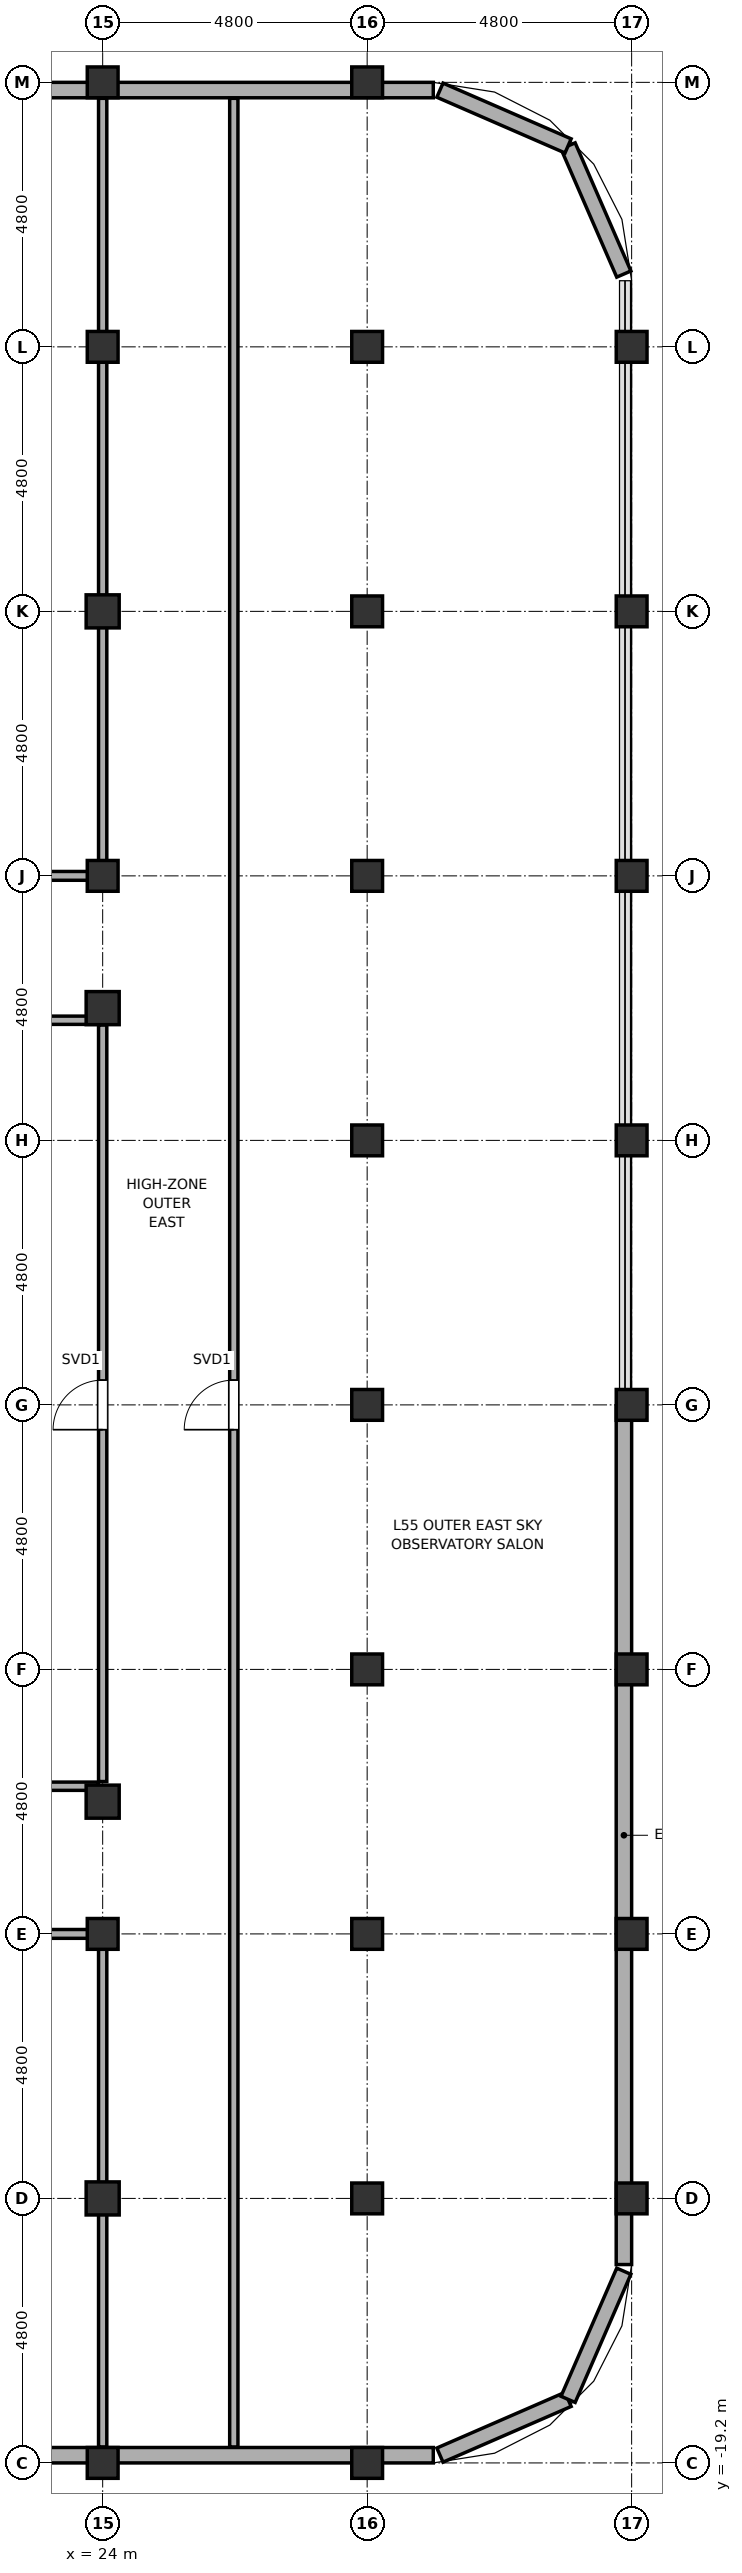
"""IFC4 building model, lengths in metres.
Left out: names, types, materials, properties, quantities, classifications, styles, units other than length and angle.
Written with IfcOpenShell. Run it as: python <this file> out.ifc"""

import sys

from ifc_helpers import new_model, si_unit, direction, frame, frame_2d, origin, origin_2d, place, context, subcontext, project, spatial, rectangle, hollow_rectangle, hollow_circle, extrude, element, fill, save


model = new_model("IFC4")
c1 = context("Model", 3, precision=1e-05, world=origin(), true_north=direction((0.0, 1.0)))
c2 = subcontext(c1, "Body", "Model", "MODEL_VIEW")
j1 = project(units=[si_unit("LENGTHUNIT", "METRE"), si_unit("PLANEANGLEUNIT", "RADIAN")], contexts=[c1])
p1 = place(None, origin())
s1 = spatial("IfcSite", under=j1, at=p1, CompositionType="ELEMENT")
p2 = place(p1, origin())
s2 = spatial("IfcBuilding", under=s1, at=p2, CompositionType="ELEMENT")
p3 = place(p2, frame((0.0, 0.0, 222.3)))
s3 = spatial("IfcBuildingStorey", under=s2, at=p3, CompositionType="ELEMENT", Elevation=222.3)
p4 = place(p3, frame((24.0, -19.2, 0.0), z_axis=(0.0, 0.0, 1.0), x_axis=(1.0, 0.0, 0.0)))
e1 = element("IfcColumn", 1, at=p4, inside=s3, PredefinedType="COLUMN", context=c2, shape_type="SweptSolid", body=[
    extrude(hollow_circle(Radius=0.28, WallThickness=0.025, at=origin_2d()), origin(), (0.0, 0.0, 1.0), 3.85),
])
p5 = place(p3, frame((24.0, -14.4, 0.0), z_axis=(0.0, 0.0, 1.0), x_axis=(1.0, 0.0, 0.0)))
e2 = element("IfcColumn", 2, at=p5, inside=s3, PredefinedType="COLUMN", context=c2, shape_type="SweptSolid", body=[
    extrude(hollow_rectangle(XDim=0.6, YDim=0.6, WallThickness=0.028, at=origin_2d()), origin(), (0.0, 0.0, 1.0), 3.85),
])
p6 = place(p3, frame((24.0, -9.6, 0.0), z_axis=(0.0, 0.0, 1.0), x_axis=(1.0, 0.0, 0.0)))
e3 = element("IfcColumn", 3, at=p6, inside=s3, PredefinedType="COLUMN", context=c2, shape_type="SweptSolid", body=[
    extrude(hollow_circle(Radius=0.28, WallThickness=0.025, at=origin_2d()), origin(), (0.0, 0.0, 1.0), 3.85),
])
for number, where, z_axis, x_axis in (
    (4, (24.0, -7.2, 0.0), (0.0, 0.0, 1.0), (1.0, 0.0, 0.0)),
    (5, (24.0, 7.2, 0.0), (0.0, 0.0, 1.0), (1.0, 0.0, 0.0)),
):
    element("IfcColumn", number, at=place(p3, frame(where, z_axis=z_axis, x_axis=x_axis)), inside=s3, PredefinedType="COLUMN", context=c2, shape_type="SweptSolid", body=[
        extrude(hollow_rectangle(XDim=0.6, YDim=0.6, WallThickness=0.028, at=origin_2d()), origin(), (0.0, 0.0, 1.0), 3.85),
    ])
p7 = place(p3, frame((24.0, 9.6, 0.0), z_axis=(0.0, 0.0, 1.0), x_axis=(1.0, 0.0, 0.0)))
e6 = element("IfcColumn", 6, at=p7, inside=s3, PredefinedType="COLUMN", context=c2, shape_type="SweptSolid", body=[
    extrude(hollow_circle(Radius=0.28, WallThickness=0.025, at=origin_2d()), origin(), (0.0, 0.0, 1.0), 3.85),
])
p8 = place(p3, frame((24.0, 14.4, 0.0), z_axis=(0.0, 0.0, 1.0), x_axis=(1.0, 0.0, 0.0)))
e7 = element("IfcColumn", 7, at=p8, inside=s3, PredefinedType="COLUMN", context=c2, shape_type="SweptSolid", body=[
    extrude(hollow_rectangle(XDim=0.6, YDim=0.6, WallThickness=0.028, at=origin_2d()), origin(), (0.0, 0.0, 1.0), 3.85),
])
p9 = place(p3, frame((24.0, 19.2, 0.0), z_axis=(0.0, 0.0, 1.0), x_axis=(1.0, 0.0, 0.0)))
e8 = element("IfcColumn", 8, at=p9, inside=s3, PredefinedType="COLUMN", context=c2, shape_type="SweptSolid", body=[
    extrude(hollow_circle(Radius=0.28, WallThickness=0.025, at=origin_2d()), origin(), (0.0, 0.0, 1.0), 3.85),
])
p10 = place(p3, frame((24.0, 24.0, -0.18), z_axis=(0.0, 0.0, 1.0), x_axis=(1.0, 0.0, 0.0)))
e9 = element("IfcColumn", 9, at=p10, inside=s3, PredefinedType="COLUMN", context=c2, shape_type="SweptSolid", body=[
    extrude(hollow_circle(Radius=0.28, WallThickness=0.025, at=origin_2d()), origin(), (0.0, 0.0, 1.0), 4.03),
])
for number, where, z_axis, x_axis in (
    (10, (28.8, -19.2, 0.0), (0.0, 0.0, 1.0), (1.0, 0.0, 0.0)),
    (11, (28.8, -14.4, 0.0), (0.0, 0.0, 1.0), (1.0, 0.0, 0.0)),
    (12, (28.8, -9.6, 0.0), (0.0, 0.0, 1.0), (1.0, 0.0, 0.0)),
    (13, (28.8, -4.8, 0.0), (0.0, 0.0, 1.0), (1.0, 0.0, 0.0)),
    (14, (28.8, 0.0, 0.0), (0.0, 0.0, 1.0), (1.0, 0.0, 0.0)),
    (15, (28.8, 4.8, 0.0), (0.0, 0.0, 1.0), (1.0, 0.0, 0.0)),
    (16, (28.8, 9.6, 0.0), (0.0, 0.0, 1.0), (1.0, 0.0, 0.0)),
    (17, (28.8, 14.4, 0.0), (0.0, 0.0, 1.0), (1.0, 0.0, 0.0)),
    (18, (28.8, 19.2, 0.0), (0.0, 0.0, 1.0), (1.0, 0.0, 0.0)),
):
    element("IfcColumn", number, at=place(p3, frame(where, z_axis=z_axis, x_axis=x_axis)), inside=s3, PredefinedType="COLUMN", context=c2, shape_type="SweptSolid", body=[
        extrude(hollow_circle(Radius=0.28, WallThickness=0.025, at=origin_2d()), origin(), (0.0, 0.0, 1.0), 3.85),
    ])
p11 = place(p3, frame((28.8, 24.0, -0.18), z_axis=(0.0, 0.0, 1.0), x_axis=(1.0, 0.0, 0.0)))
e19 = element("IfcColumn", 19, at=p11, inside=s3, PredefinedType="COLUMN", context=c2, shape_type="SweptSolid", body=[
    extrude(hollow_circle(Radius=0.28, WallThickness=0.025, at=origin_2d()), origin(), (0.0, 0.0, 1.0), 4.03),
])
for number, where, z_axis, x_axis in (
    (20, (33.6, -14.4, 0.0), (0.0, 0.0, 1.0), (1.0, 0.0, 0.0)),
    (21, (33.6, -9.6, 0.0), (0.0, 0.0, 1.0), (1.0, 0.0, 0.0)),
    (22, (33.6, -4.8, 0.0), (0.0, 0.0, 1.0), (1.0, 0.0, 0.0)),
    (23, (33.6, 0.0, 0.0), (0.0, 0.0, 1.0), (1.0, 0.0, 0.0)),
    (24, (33.6, 4.8, 0.0), (0.0, 0.0, 1.0), (1.0, 0.0, 0.0)),
    (25, (33.6, 9.6, 0.0), (0.0, 0.0, 1.0), (1.0, 0.0, 0.0)),
    (26, (33.6, 14.4, 0.0), (0.0, 0.0, 1.0), (1.0, 0.0, 0.0)),
):
    element("IfcColumn", number, at=place(p3, frame(where, z_axis=z_axis, x_axis=x_axis)), inside=s3, PredefinedType="COLUMN", context=c2, shape_type="SweptSolid", body=[
        extrude(hollow_circle(Radius=0.28, WallThickness=0.025, at=origin_2d()), origin(), (0.0, 0.0, 1.0), 3.85),
    ])
p12 = place(p3, frame((33.6, 19.2, -0.18), z_axis=(0.0, 0.0, 1.0), x_axis=(1.0, 0.0, 0.0)))
e27 = element("IfcColumn", 27, at=p12, inside=s3, PredefinedType="COLUMN", context=c2, shape_type="SweptSolid", body=[
    extrude(hollow_circle(Radius=0.28, WallThickness=0.025, at=origin_2d()), origin(), (0.0, 0.0, 1.0), 4.03),
])
p13 = place(p3, frame((30.121, -19.058, 0.0), z_axis=(0.0, 0.0, 1.0), x_axis=(0.917060872934, 0.398747232384, 0.0)))
e28 = element("IfcWall", 28, at=p13, inside=s3, PredefinedType="SOLIDWALL", context=c2, shape_type="SweptSolid", body=[
    extrude(rectangle(XDim=2.536, YDim=0.28, at=frame_2d((1.268, 0.0))), origin(), (0.0, 0.0, 1.0), 2.27),
])
for number, where, z_axis, x_axis in (
    (29, (32.447, -18.047, 0.0), (0.0, 0.0, 1.0), (0.399, 0.917, 0.0)),
    (30, (33.458, 20.521, 0.0), (0.0, 0.0, 1.0), (-0.399, 0.917, 0.0)),
):
    element("IfcWall", number, at=place(p3, frame(where, z_axis=z_axis, x_axis=x_axis)), inside=s3, PredefinedType="SOLIDWALL", context=c2, shape_type="SweptSolid", body=[
        extrude(rectangle(XDim=2.536, YDim=0.28, at=frame_2d((1.268, 0.0))), origin(), (0.0, 0.0, 1.0), 2.27),
    ])
p14 = place(p3, frame((32.447, 22.847, 0.0), z_axis=(0.0, 0.0, 1.0), x_axis=(-0.917060872934, 0.398747232384, 0.0)))
e31 = element("IfcWall", 31, at=p14, inside=s3, PredefinedType="SOLIDWALL", context=c2, shape_type="SweptSolid", body=[
    extrude(rectangle(XDim=2.536, YDim=0.28, at=frame_2d((1.268, 0.0))), origin(), (0.0, 0.0, 1.0), 2.27),
])
p15 = place(p3, frame((4.75, -19.06, 0.0), z_axis=(0.0, 0.0, 1.0), x_axis=(1.0, 0.0, 0.0)))
e32 = element("IfcWall", 32, at=p15, inside=s3, PredefinedType="SOLIDWALL", context=c2, shape_type="SweptSolid", body=[
    extrude(rectangle(XDim=25.25, YDim=0.28, at=frame_2d((12.625, 0.0))), origin(), (0.0, 0.0, 1.0), 2.27),
])
p16 = place(p15, frame((16.25, 0.0, 0.75)))
e33 = element("IfcOpeningElement", 33, at=p16, cuts=e32, PredefinedType="OPENING", context=c2, shape_type="SweptSolid", body=[
    extrude(rectangle(XDim=1.2, YDim=1.15, at=frame_2d((0.6, 0.575))), frame((0.0, 0.155, 0.0), z_axis=(0.0, -1.0, 0.0), x_axis=(1.0, 0.0, 0.0)), (0.0, 0.0, 1.0), 0.31),
])
p17 = place(p15, frame((6.65, 0.0, 0.75)))
e34 = element("IfcOpeningElement", 34, at=p17, cuts=e32, PredefinedType="OPENING", context=c2, shape_type="SweptSolid", body=[
    extrude(rectangle(XDim=1.2, YDim=1.15, at=frame_2d((0.6, 0.575))), frame((0.0, 0.155, 0.0), z_axis=(0.0, -1.0, 0.0), x_axis=(1.0, 0.0, 0.0)), (0.0, 0.0, 1.0), 0.31),
])
p18 = place(p15, frame((11.45, 0.0, 0.75)))
e35 = element("IfcOpeningElement", 35, at=p18, cuts=e32, PredefinedType="OPENING", context=c2, shape_type="SweptSolid", body=[
    extrude(rectangle(XDim=1.2, YDim=1.15, at=frame_2d((0.6, 0.575))), frame((0.0, 0.155, 0.0), z_axis=(0.0, -1.0, 0.0), x_axis=(1.0, 0.0, 0.0)), (0.0, 0.0, 1.0), 0.31),
])
p19 = place(p3, frame((4.75, 23.86, 0.0), z_axis=(0.0, 0.0, 1.0), x_axis=(1.0, 0.0, 0.0)))
e36 = element("IfcWall", 36, at=p19, inside=s3, PredefinedType="SOLIDWALL", context=c2, shape_type="SweptSolid", body=[
    extrude(rectangle(XDim=25.25, YDim=0.28, at=frame_2d((12.625, 0.0))), origin(), (0.0, 0.0, 1.0), 2.27),
])
p20 = place(p19, frame((16.25, 0.0, 0.75)))
e37 = element("IfcOpeningElement", 37, at=p20, cuts=e36, PredefinedType="OPENING", context=c2, shape_type="SweptSolid", body=[
    extrude(rectangle(XDim=1.2, YDim=1.15, at=frame_2d((0.6, 0.575))), frame((0.0, 0.155, 0.0), z_axis=(0.0, -1.0, 0.0), x_axis=(1.0, 0.0, 0.0)), (0.0, 0.0, 1.0), 0.31),
])
p21 = place(p19, frame((7.684, 0.0, 0.75)))
e38 = element("IfcOpeningElement", 38, at=p21, cuts=e36, PredefinedType="OPENING", context=c2, shape_type="SweptSolid", body=[
    extrude(rectangle(XDim=1.2, YDim=1.15, at=frame_2d((0.6, 0.575))), frame((0.0, 0.155, 0.0), z_axis=(0.0, -1.0, 0.0), x_axis=(1.0, 0.0, 0.0)), (0.0, 0.0, 1.0), 0.31),
])
p22 = place(p3, frame((33.46, -15.6, 0.0), z_axis=(0.0, 0.0, 1.0), x_axis=(0.0, 1.0, 0.0)))
e39 = element("IfcWall", 39, at=p22, inside=s3, PredefinedType="SOLIDWALL", context=c2, shape_type="SweptSolid", body=[
    extrude(rectangle(XDim=15.58, YDim=0.28, at=frame_2d((7.79, 0.0))), origin(), (0.0, 0.0, 1.0), 2.27),
])
p23 = place(p3, frame((-23.92, -9.6, 0.0), z_axis=(0.0, 0.0, 1.0), x_axis=(1.0, 0.0, 0.0)))
e40 = element("IfcWall", 40, at=p23, inside=s3, PredefinedType="PARTITIONING", context=c2, shape_type="SweptSolid", body=[
    extrude(rectangle(XDim=47.84, YDim=0.16, at=frame_2d((23.92, 0.0))), origin(), (0.0, 0.0, 1.0), 2.27),
])
p24 = place(p23, frame((1.87, 0.0, 0.0)))
e41 = element("IfcOpeningElement", 41, at=p24, cuts=e40, PredefinedType="OPENING", context=c2, shape_type="SweptSolid", body=[
    extrude(rectangle(XDim=0.9, YDim=2.1, at=frame_2d((0.45, 1.05))), frame((0.0, 0.095, 0.0), z_axis=(0.0, -1.0, 0.0), x_axis=(1.0, 0.0, 0.0)), (0.0, 0.0, 1.0), 0.19),
])
p25 = place(p23, frame((45.07, 0.0, 0.0)))
e42 = element("IfcOpeningElement", 42, at=p25, cuts=e40, PredefinedType="OPENING", context=c2, shape_type="SweptSolid", body=[
    extrude(rectangle(XDim=0.9, YDim=2.1, at=frame_2d((0.45, 1.05))), frame((0.0, 0.095, 0.0), z_axis=(0.0, -1.0, 0.0), x_axis=(1.0, 0.0, 0.0)), (0.0, 0.0, 1.0), 0.19),
])
p26 = place(p23, frame((6.67, 0.0, 0.0)))
e43 = element("IfcOpeningElement", 43, at=p26, cuts=e40, PredefinedType="OPENING", context=c2, shape_type="SweptSolid", body=[
    extrude(rectangle(XDim=0.9, YDim=2.1, at=frame_2d((0.45, 1.05))), frame((0.0, 0.095, 0.0), z_axis=(0.0, -1.0, 0.0), x_axis=(1.0, 0.0, 0.0)), (0.0, 0.0, 1.0), 0.19),
])
p27 = place(p23, frame((11.47, 0.0, 0.0)))
e44 = element("IfcOpeningElement", 44, at=p27, cuts=e40, PredefinedType="OPENING", context=c2, shape_type="SweptSolid", body=[
    extrude(rectangle(XDim=0.9, YDim=2.1, at=frame_2d((0.45, 1.05))), frame((0.0, 0.095, 0.0), z_axis=(0.0, -1.0, 0.0), x_axis=(1.0, 0.0, 0.0)), (0.0, 0.0, 1.0), 0.19),
])
p28 = place(p23, frame((16.27, 0.0, 0.0)))
e45 = element("IfcOpeningElement", 45, at=p28, cuts=e40, PredefinedType="OPENING", context=c2, shape_type="SweptSolid", body=[
    extrude(rectangle(XDim=0.9, YDim=2.1, at=frame_2d((0.45, 1.05))), frame((0.0, 0.095, 0.0), z_axis=(0.0, -1.0, 0.0), x_axis=(1.0, 0.0, 0.0)), (0.0, 0.0, 1.0), 0.19),
])
p29 = place(p23, frame((34.89, 0.0, 0.0)))
e46 = element("IfcOpeningElement", 46, at=p29, cuts=e40, PredefinedType="OPENING", context=c2, shape_type="SweptSolid", body=[
    extrude(rectangle(XDim=0.92, YDim=2.15, at=frame_2d((0.46, 1.075))), frame((0.0, 0.095, 0.0), z_axis=(0.0, -1.0, 0.0), x_axis=(1.0, 0.0, 0.0)), (0.0, 0.0, 1.0), 0.19),
])
p30 = place(p23, frame((40.83, 0.0, 0.0)))
e47 = element("IfcOpeningElement", 47, at=p30, cuts=e40, PredefinedType="OPENING", context=c2, shape_type="SweptSolid", body=[
    extrude(rectangle(XDim=0.92, YDim=2.15, at=frame_2d((0.46, 1.075))), frame((0.0, 0.095, 0.0), z_axis=(0.0, -1.0, 0.0), x_axis=(1.0, 0.0, 0.0)), (0.0, 0.0, 1.0), 0.19),
])
for number, where, z_axis, x_axis in (
    (48, (14.52, -6.92, 0.0), (0.0, 0.0, 1.0), (1.0, 0.0, 0.0)),
    (49, (14.52, 6.98, 0.0), (0.0, 0.0, 1.0), (1.0, 0.0, 0.0)),
):
    element("IfcWall", number, at=place(p3, frame(where, z_axis=z_axis, x_axis=x_axis)), inside=s3, PredefinedType="PARTITIONING", context=c2, shape_type="SweptSolid", body=[
        extrude(rectangle(XDim=9.4, YDim=0.15, at=frame_2d((4.7, 0.0))), origin(), (0.0, 0.0, 1.0), 2.27),
    ])
p31 = place(p3, frame((-23.92, 9.6, 0.0), z_axis=(0.0, 0.0, 1.0), x_axis=(1.0, 0.0, 0.0)))
e50 = element("IfcWall", 50, at=p31, inside=s3, PredefinedType="PARTITIONING", context=c2, shape_type="SweptSolid", body=[
    extrude(rectangle(XDim=47.84, YDim=0.16, at=frame_2d((23.92, 0.0))), origin(), (0.0, 0.0, 1.0), 2.27),
])
p32 = place(p31, frame((1.87, 0.0, 0.0)))
e51 = element("IfcOpeningElement", 51, at=p32, cuts=e50, PredefinedType="OPENING", context=c2, shape_type="SweptSolid", body=[
    extrude(rectangle(XDim=0.9, YDim=2.1, at=frame_2d((0.45, 1.05))), frame((0.0, 0.095, 0.0), z_axis=(0.0, -1.0, 0.0), x_axis=(1.0, 0.0, 0.0)), (0.0, 0.0, 1.0), 0.19),
])
p33 = place(p31, frame((45.07, 0.0, 0.0)))
e52 = element("IfcOpeningElement", 52, at=p33, cuts=e50, PredefinedType="OPENING", context=c2, shape_type="SweptSolid", body=[
    extrude(rectangle(XDim=0.9, YDim=2.1, at=frame_2d((0.45, 1.05))), frame((0.0, 0.095, 0.0), z_axis=(0.0, -1.0, 0.0), x_axis=(1.0, 0.0, 0.0)), (0.0, 0.0, 1.0), 0.19),
])
p34 = place(p31, frame((5.98, 0.0, 0.0)))
e53 = element("IfcOpeningElement", 53, at=p34, cuts=e50, PredefinedType="OPENING", context=c2, shape_type="SweptSolid", body=[
    extrude(rectangle(XDim=0.9, YDim=2.1, at=frame_2d((0.45, 1.05))), frame((0.0, 0.095, 0.0), z_axis=(0.0, -1.0, 0.0), x_axis=(1.0, 0.0, 0.0)), (0.0, 0.0, 1.0), 0.19),
])
p35 = place(p31, frame((7.87, 0.0, 0.0)))
e54 = element("IfcOpeningElement", 54, at=p35, cuts=e50, PredefinedType="OPENING", context=c2, shape_type="SweptSolid", body=[
    extrude(rectangle(XDim=0.9, YDim=2.1, at=frame_2d((0.45, 1.05))), frame((0.0, 0.095, 0.0), z_axis=(0.0, -1.0, 0.0), x_axis=(1.0, 0.0, 0.0)), (0.0, 0.0, 1.0), 0.19),
])
p36 = place(p31, frame((10.395, 0.0, 0.0)))
e55 = element("IfcOpeningElement", 55, at=p36, cuts=e50, PredefinedType="OPENING", context=c2, shape_type="SweptSolid", body=[
    extrude(rectangle(XDim=0.92, YDim=2.15, at=frame_2d((0.46, 1.075))), frame((0.0, 0.095, 0.0), z_axis=(0.0, -1.0, 0.0), x_axis=(1.0, 0.0, 0.0)), (0.0, 0.0, 1.0), 0.19),
])
p37 = place(p31, frame((17.325, 0.0, 0.0)))
e56 = element("IfcOpeningElement", 56, at=p37, cuts=e50, PredefinedType="OPENING", context=c2, shape_type="SweptSolid", body=[
    extrude(rectangle(XDim=0.92, YDim=2.15, at=frame_2d((0.46, 1.075))), frame((0.0, 0.095, 0.0), z_axis=(0.0, -1.0, 0.0), x_axis=(1.0, 0.0, 0.0)), (0.0, 0.0, 1.0), 0.19),
])
p38 = place(p31, frame((21.07, 0.0, 0.0)))
e57 = element("IfcOpeningElement", 57, at=p38, cuts=e50, PredefinedType="OPENING", context=c2, shape_type="SweptSolid", body=[
    extrude(rectangle(XDim=0.9, YDim=2.1, at=frame_2d((0.45, 1.05))), frame((0.0, 0.095, 0.0), z_axis=(0.0, -1.0, 0.0), x_axis=(1.0, 0.0, 0.0)), (0.0, 0.0, 1.0), 0.19),
])
p39 = place(p31, frame((35.47, 0.0, 0.0)))
e58 = element("IfcOpeningElement", 58, at=p39, cuts=e50, PredefinedType="OPENING", context=c2, shape_type="SweptSolid", body=[
    extrude(rectangle(XDim=0.9, YDim=2.1, at=frame_2d((0.45, 1.05))), frame((0.0, 0.095, 0.0), z_axis=(0.0, -1.0, 0.0), x_axis=(1.0, 0.0, 0.0)), (0.0, 0.0, 1.0), 0.19),
])
p40 = place(p3, frame((24.0, -18.91, 0.0), z_axis=(0.0, 0.0, 1.0), x_axis=(0.0, 1.0, 0.0)))
e59 = element("IfcWall", 59, at=p40, inside=s3, PredefinedType="PARTITIONING", context=c2, shape_type="SweptSolid", body=[
    extrude(rectangle(XDim=9.19, YDim=0.15, at=frame_2d((4.595, 0.0))), origin(), (0.0, 0.0, 1.0), 2.27),
])
p41 = place(p3, frame((24.0, -6.835, 0.0), z_axis=(0.0, 0.0, 1.0), x_axis=(0.0, 1.0, 0.0)))
e60 = element("IfcWall", 60, at=p41, inside=s3, PredefinedType="PARTITIONING", context=c2, shape_type="SweptSolid", body=[
    extrude(rectangle(XDim=13.73, YDim=0.15, at=frame_2d((6.865, 0.0))), origin(), (0.0, 0.0, 1.0), 2.27),
])
p42 = place(p41, frame((6.385, 0.0, 0.0)))
e61 = element("IfcOpeningElement", 61, at=p42, cuts=e60, PredefinedType="OPENING", context=c2, shape_type="SweptSolid", body=[
    extrude(rectangle(XDim=0.9, YDim=2.1, at=frame_2d((0.45, 1.05))), frame((0.0, 0.09, 0.0), z_axis=(0.0, -1.0, 0.0), x_axis=(1.0, 0.0, 0.0)), (0.0, 0.0, 1.0), 0.18),
])
p43 = place(p3, frame((24.0, 9.72, 0.0), z_axis=(0.0, 0.0, 1.0), x_axis=(0.0, 1.0, 0.0)))
e62 = element("IfcWall", 62, at=p43, inside=s3, PredefinedType="PARTITIONING", context=c2, shape_type="SweptSolid", body=[
    extrude(rectangle(XDim=13.99, YDim=0.15, at=frame_2d((6.995, 0.0))), origin(), (0.0, 0.0, 1.0), 2.27),
])
p44 = place(p3, frame((26.38, -18.91, 0.0), z_axis=(0.0, 0.0, 1.0), x_axis=(0.0, 1.0, 0.0)))
e63 = element("IfcWall", 63, at=p44, inside=s3, PredefinedType="PARTITIONING", context=c2, shape_type="SweptSolid", body=[
    extrude(rectangle(XDim=42.62, YDim=0.15, at=frame_2d((21.31, 0.0))), origin(), (0.0, 0.0, 1.0), 2.27),
])
p45 = place(p44, frame((18.46, 0.0, 0.0)))
e64 = element("IfcOpeningElement", 64, at=p45, cuts=e63, PredefinedType="OPENING", context=c2, shape_type="SweptSolid", body=[
    extrude(rectangle(XDim=0.9, YDim=2.1, at=frame_2d((0.45, 1.05))), frame((0.0, 0.09, 0.0), z_axis=(0.0, -1.0, 0.0), x_axis=(1.0, 0.0, 0.0)), (0.0, 0.0, 1.0), 0.18),
])
p46 = place(p42, origin())
e65 = element("IfcDoor", 65, at=p46, inside=s3, OperationType="SINGLE_SWING_LEFT", PredefinedType="DOOR", context=c2, shape_type="SweptSolid", body=[
    extrude(rectangle(XDim=0.9, YDim=2.1, at=frame_2d((0.45, 1.05))), frame((0.0, 0.025, 0.0), z_axis=(0.0, -1.0, 0.0), x_axis=(1.0, 0.0, 0.0)), (0.0, 0.0, 1.0), 0.05),
])
fill(e61, e65)
p47 = place(p45, origin())
e66 = element("IfcDoor", 66, at=p47, inside=s3, OperationType="SINGLE_SWING_LEFT", PredefinedType="DOOR", context=c2, shape_type="SweptSolid", body=[
    extrude(rectangle(XDim=0.9, YDim=2.1, at=frame_2d((0.45, 1.05))), frame((0.0, 0.025, 0.0), z_axis=(0.0, -1.0, 0.0), x_axis=(1.0, 0.0, 0.0)), (0.0, 0.0, 1.0), 0.05),
])
fill(e64, e66)
save(model, sys.argv[1])
